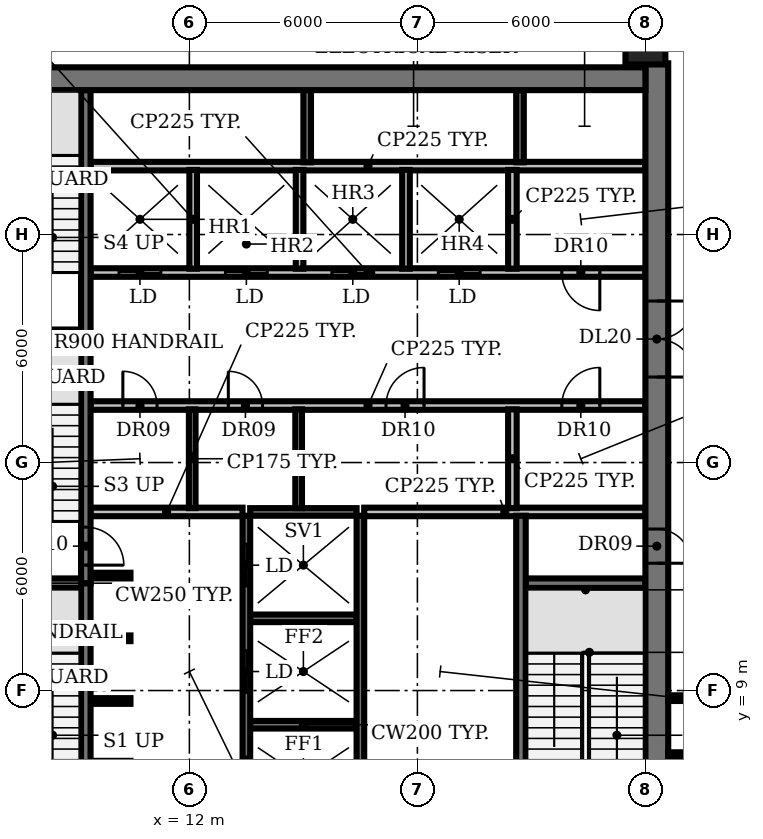
"""IFC4 building model, lengths in metres.
Left out: names, types, materials, properties, quantities, classifications, styles, units other than length and angle.
Written with IfcOpenShell. Run it as: python <this file> out.ifc"""

import sys

from ifc_helpers import new_model, si_unit, direction, frame, frame_2d, origin, origin_2d, place, context, subcontext, project, spatial, rectangle, circle, extrude, element, fill, save


model = new_model("IFC4")
c1 = context("Model", 3, precision=1e-05, world=origin(), true_north=direction((0.0, 1.0)))
c2 = subcontext(c1, "Body", "Model", "MODEL_VIEW")
j1 = project(units=[si_unit("LENGTHUNIT", "METRE"), si_unit("PLANEANGLEUNIT", "RADIAN")], contexts=[c1])
p1 = place(None, origin())
s1 = spatial("IfcSite", under=j1, at=p1, CompositionType="ELEMENT")
p2 = place(p1, origin())
s2 = spatial("IfcBuilding", under=s1, at=p2, CompositionType="ELEMENT")
p3 = place(p2, frame((0.0, 0.0, 192.8)))
s3 = spatial("IfcBuildingStorey", under=s2, at=p3, CompositionType="ELEMENT", Elevation=192.8)
p4 = place(p3, frame((24.0, 26.0, 0.0), z_axis=(0.0, 0.0, 1.0), x_axis=(1.0, 0.0, 0.0)))
e1 = element("IfcColumn", 1, at=p4, inside=s3, PredefinedType="COLUMN", context=c2, shape_type="SweptSolid", body=[
    extrude(circle(Radius=0.525, at=origin_2d()), origin(), (0.0, 0.0, 1.0), 3.2),
])
p5 = place(p3, frame((13.6, 8.1, 0.0), z_axis=(0.0, 0.0, 1.0), x_axis=(1.0, 0.0, 0.0)))
e2 = element("IfcWall", 2, at=p5, inside=s3, PredefinedType="SHEAR", context=c2, shape_type="SweptSolid", body=[
    extrude(rectangle(XDim=2.8, YDim=0.2, at=frame_2d((1.4, 0.0))), origin(), (0.0, 0.0, 1.0), 3.8),
])
for number, where, z_axis, x_axis in (
    (3, (9.4, 8.725, 0.0), (0.0, 0.0, 1.0), (1.0, 0.0, 0.0)),
    (4, (9.4, 10.375, 0.0), (0.0, 0.0, 1.0), (1.0, 0.0, 0.0)),
):
    element("IfcWall", number, at=place(p3, frame(where, z_axis=z_axis, x_axis=x_axis)), inside=s3, PredefinedType="SHEAR", context=c2, shape_type="SweptSolid", body=[
        extrude(rectangle(XDim=1.05, YDim=0.15, at=frame_2d((0.525, 0.0))), origin(), (0.0, 0.0, 1.0), 3.8),
    ])
p6 = place(p3, frame((13.6, 10.9, 0.0), z_axis=(0.0, 0.0, 1.0), x_axis=(1.0, 0.0, 0.0)))
e5 = element("IfcWall", 5, at=p6, inside=s3, PredefinedType="SHEAR", context=c2, shape_type="SweptSolid", body=[
    extrude(rectangle(XDim=2.8, YDim=0.2, at=frame_2d((1.4, 0.0))), origin(), (0.0, 0.0, 1.0), 3.8),
])
for number, where, z_axis, x_axis in (
    (6, (6.0, 11.825, 0.0), (0.0, 0.0, 1.0), (1.0, 0.0, 0.0)),
    (7, (20.85, 11.825, 0.0), (0.0, 0.0, 1.0), (1.0, 0.0, 0.0)),
):
    element("IfcWall", number, at=place(p3, frame(where, z_axis=z_axis, x_axis=x_axis)), inside=s3, PredefinedType="SHEAR", context=c2, shape_type="SweptSolid", body=[
        extrude(rectangle(XDim=3.15, YDim=0.25, at=frame_2d((1.575, 0.0))), origin(), (0.0, 0.0, 1.0), 3.8),
    ])
p7 = place(p3, frame((9.4, 12.025, 0.0), z_axis=(0.0, 0.0, 1.0), x_axis=(1.0, 0.0, 0.0)))
e8 = element("IfcWall", 8, at=p7, inside=s3, PredefinedType="SHEAR", context=c2, shape_type="SweptSolid", body=[
    extrude(rectangle(XDim=1.05, YDim=0.15, at=frame_2d((0.525, 0.0))), origin(), (0.0, 0.0, 1.0), 3.8),
])
p8 = place(p3, frame((9.4, 13.7, 0.0), z_axis=(0.0, 0.0, 1.0), x_axis=(1.0, 0.0, 0.0)))
e9 = element("IfcWall", 9, at=p8, inside=s3, PredefinedType="PARTITIONING", context=c2, shape_type="SweptSolid", body=[
    extrude(rectangle(XDim=4.0, YDim=0.225, at=frame_2d((2.0, 0.0))), origin(), (0.0, 0.0, 1.0), 3.8),
])
p9 = place(p3, frame((13.6, 13.7, 0.0), z_axis=(0.0, 0.0, 1.0), x_axis=(1.0, 0.0, 0.0)))
e10 = element("IfcWall", 10, at=p9, inside=s3, PredefinedType="SHEAR", context=c2, shape_type="SweptSolid", body=[
    extrude(rectangle(XDim=2.8, YDim=0.2, at=frame_2d((1.4, 0.0))), origin(), (0.0, 0.0, 1.0), 3.8),
])
p10 = place(p3, frame((16.6, 13.7, 0.0), z_axis=(0.0, 0.0, 1.0), x_axis=(1.0, 0.0, 0.0)))
e11 = element("IfcWall", 11, at=p10, inside=s3, PredefinedType="PARTITIONING", context=c2, shape_type="SweptSolid", body=[
    extrude(rectangle(XDim=7.4, YDim=0.225, at=frame_2d((3.7, 0.0))), origin(), (0.0, 0.0, 1.0), 3.8),
])
p11 = place(p3, frame((9.4, 16.5, 0.0), z_axis=(0.0, 0.0, 1.0), x_axis=(1.0, 0.0, 0.0)))
e12 = element("IfcWall", 12, at=p11, inside=s3, PredefinedType="PARTITIONING", context=c2, shape_type="SweptSolid", body=[
    extrude(rectangle(XDim=14.6, YDim=0.225, at=frame_2d((7.3, 0.0))), origin(), (0.0, 0.0, 1.0), 3.8),
])
p12 = place(p11, frame((0.85, 0.0, 0.0)))
e13 = element("IfcOpeningElement", 13, at=p12, cuts=e12, PredefinedType="OPENING", context=c2, shape_type="SweptSolid", body=[
    extrude(rectangle(XDim=0.9, YDim=2.1, at=frame_2d((0.45, 1.05))), frame((0.0, 0.123, 0.0), z_axis=(0.0, -1.0, 0.0), x_axis=(1.0, 0.0, 0.0)), (0.0, 0.0, 1.0), 0.245),
])
p13 = place(p11, frame((3.625, 0.0, 0.0)))
e14 = element("IfcOpeningElement", 14, at=p13, cuts=e12, PredefinedType="OPENING", context=c2, shape_type="SweptSolid", body=[
    extrude(rectangle(XDim=0.9, YDim=2.1, at=frame_2d((0.45, 1.05))), frame((0.0, 0.123, 0.0), z_axis=(0.0, -1.0, 0.0), x_axis=(1.0, 0.0, 0.0)), (0.0, 0.0, 1.0), 0.245),
])
p14 = place(p11, frame((7.775, 0.0, 0.0)))
e15 = element("IfcOpeningElement", 15, at=p14, cuts=e12, PredefinedType="OPENING", context=c2, shape_type="SweptSolid", body=[
    extrude(rectangle(XDim=1.0, YDim=2.1, at=frame_2d((0.5, 1.05))), frame((0.0, 0.123, 0.0), z_axis=(0.0, -1.0, 0.0), x_axis=(1.0, 0.0, 0.0)), (0.0, 0.0, 1.0), 0.245),
])
p15 = place(p11, frame((12.4, 0.0, 0.0)))
e16 = element("IfcOpeningElement", 16, at=p15, cuts=e12, PredefinedType="OPENING", context=c2, shape_type="SweptSolid", body=[
    extrude(rectangle(XDim=1.0, YDim=2.1, at=frame_2d((0.5, 1.05))), frame((0.0, 0.123, 0.0), z_axis=(0.0, -1.0, 0.0), x_axis=(1.0, 0.0, 0.0)), (0.0, 0.0, 1.0), 0.245),
])
p16 = place(p3, frame((6.0, 18.375, 0.0), z_axis=(0.0, 0.0, 1.0), x_axis=(1.0, 0.0, 0.0)))
e17 = element("IfcWall", 17, at=p16, inside=s3, PredefinedType="SHEAR", context=c2, shape_type="SweptSolid", body=[
    extrude(rectangle(XDim=3.15, YDim=0.25, at=frame_2d((1.575, 0.0))), origin(), (0.0, 0.0, 1.0), 3.8),
])
p17 = place(p3, frame((24.0, 20.0, 0.0), z_axis=(0.0, 0.0, 1.0), x_axis=(-1.0, 0.0, 0.0)))
e18 = element("IfcWall", 18, at=p17, inside=s3, PredefinedType="PARTITIONING", context=c2, shape_type="SweptSolid", body=[
    extrude(rectangle(XDim=14.6, YDim=0.225, at=frame_2d((7.3, 0.0))), origin(), (0.0, 0.0, 1.0), 3.8),
])
p18 = place(p17, frame((12.75, 0.0, 0.0)))
e19 = element("IfcOpeningElement", 19, at=p18, cuts=e18, PredefinedType="OPENING", context=c2, shape_type="SweptSolid", body=[
    extrude(rectangle(XDim=1.1, YDim=2.1, at=frame_2d((0.55, 1.05))), frame((0.0, 0.123, 0.0), z_axis=(0.0, -1.0, 0.0), x_axis=(1.0, 0.0, 0.0)), (0.0, 0.0, 1.0), 0.245),
])
p19 = place(p17, frame((9.95, 0.0, 0.0)))
e20 = element("IfcOpeningElement", 20, at=p19, cuts=e18, PredefinedType="OPENING", context=c2, shape_type="SweptSolid", body=[
    extrude(rectangle(XDim=1.1, YDim=2.1, at=frame_2d((0.55, 1.05))), frame((0.0, 0.123, 0.0), z_axis=(0.0, -1.0, 0.0), x_axis=(1.0, 0.0, 0.0)), (0.0, 0.0, 1.0), 0.245),
])
p20 = place(p17, frame((7.15, 0.0, 0.0)))
e21 = element("IfcOpeningElement", 21, at=p20, cuts=e18, PredefinedType="OPENING", context=c2, shape_type="SweptSolid", body=[
    extrude(rectangle(XDim=1.1, YDim=2.1, at=frame_2d((0.55, 1.05))), frame((0.0, 0.123, 0.0), z_axis=(0.0, -1.0, 0.0), x_axis=(1.0, 0.0, 0.0)), (0.0, 0.0, 1.0), 0.245),
])
p21 = place(p17, frame((4.35, 0.0, 0.0)))
e22 = element("IfcOpeningElement", 22, at=p21, cuts=e18, PredefinedType="OPENING", context=c2, shape_type="SweptSolid", body=[
    extrude(rectangle(XDim=1.1, YDim=2.1, at=frame_2d((0.55, 1.05))), frame((0.0, 0.123, 0.0), z_axis=(0.0, -1.0, 0.0), x_axis=(1.0, 0.0, 0.0)), (0.0, 0.0, 1.0), 0.245),
])
p22 = place(p17, frame((1.2, 0.0, 0.0)))
e23 = element("IfcOpeningElement", 23, at=p22, cuts=e18, PredefinedType="OPENING", context=c2, shape_type="SweptSolid", body=[
    extrude(rectangle(XDim=1.0, YDim=2.1, at=frame_2d((0.5, 1.05))), frame((0.0, 0.123, 0.0), z_axis=(0.0, -1.0, 0.0), x_axis=(1.0, 0.0, 0.0)), (0.0, 0.0, 1.0), 0.245),
])
p23 = place(p3, frame((9.4, 22.8, 0.0), z_axis=(0.0, 0.0, 1.0), x_axis=(1.0, 0.0, 0.0)))
e24 = element("IfcWall", 24, at=p23, inside=s3, PredefinedType="PARTITIONING", context=c2, shape_type="SweptSolid", body=[
    extrude(rectangle(XDim=14.6, YDim=0.225, at=frame_2d((7.3, 0.0))), origin(), (0.0, 0.0, 1.0), 3.8),
])
p24 = place(p3, frame((9.275, 11.825, 0.0), z_axis=(0.0, 0.0, 1.0), x_axis=(0.0, -1.0, 0.0)))
e25 = element("IfcWall", 25, at=p24, inside=s3, PredefinedType="SHEAR", context=c2, shape_type="SweptSolid", body=[
    extrude(rectangle(XDim=6.425, YDim=0.25, at=frame_2d((3.212, 0.0))), origin(), (0.0, 0.0, 1.0), 3.8),
])
p25 = place(p24, frame((5.075, 0.0, 0.0)))
e26 = element("IfcOpeningElement", 26, at=p25, cuts=e25, PredefinedType="OPENING", context=c2, shape_type="SweptSolid", body=[
    extrude(rectangle(XDim=1.0, YDim=2.1, at=frame_2d((0.5, 1.05))), frame((0.0, 0.135, 0.0), z_axis=(0.0, -1.0, 0.0), x_axis=(1.0, 0.0, 0.0)), (0.0, 0.0, 1.0), 0.27),
])
p26 = place(p3, frame((9.275, 18.375, 0.0), z_axis=(0.0, 0.0, 1.0), x_axis=(0.0, -1.0, 0.0)))
e27 = element("IfcWall", 27, at=p26, inside=s3, PredefinedType="SHEAR", context=c2, shape_type="SweptSolid", body=[
    extrude(rectangle(XDim=6.55, YDim=0.25, at=frame_2d((3.275, 0.0))), origin(), (0.0, 0.0, 1.0), 3.8),
])
p27 = place(p26, frame((5.075, 0.0, 0.0)))
e28 = element("IfcOpeningElement", 28, at=p27, cuts=e27, PredefinedType="OPENING", context=c2, shape_type="SweptSolid", body=[
    extrude(rectangle(XDim=1.0, YDim=2.1, at=frame_2d((0.5, 1.05))), frame((0.0, 0.135, 0.0), z_axis=(0.0, -1.0, 0.0), x_axis=(1.0, 0.0, 0.0)), (0.0, 0.0, 1.0), 0.27),
])
p28 = place(p3, frame((9.275, 18.375, 0.0), z_axis=(0.0, 0.0, 1.0), x_axis=(0.0, 1.0, 0.0)))
e29 = element("IfcWall", 29, at=p28, inside=s3, PredefinedType="SHEAR", context=c2, shape_type="SweptSolid", body=[
    extrude(rectangle(XDim=6.425, YDim=0.25, at=frame_2d((3.212, 0.0))), origin(), (0.0, 0.0, 1.0), 3.8),
])
p29 = place(p3, frame((12.075, 13.8, 0.0), z_axis=(0.0, 0.0, 1.0), x_axis=(0.0, 1.0, 0.0)))
e30 = element("IfcWall", 30, at=p29, inside=s3, PredefinedType="PARTITIONING", context=c2, shape_type="SweptSolid", body=[
    extrude(rectangle(XDim=2.6, YDim=0.175, at=frame_2d((1.3, 0.0))), origin(), (0.0, 0.0, 1.0), 3.8),
])
p30 = place(p3, frame((12.1, 20.1, 0.0), z_axis=(0.0, 0.0, 1.0), x_axis=(0.0, 1.0, 0.0)))
e31 = element("IfcWall", 31, at=p30, inside=s3, PredefinedType="SOLIDWALL", context=c2, shape_type="SweptSolid", body=[
    extrude(rectangle(XDim=2.6, YDim=0.2, at=frame_2d((1.3, 0.0))), origin(), (0.0, 0.0, 1.0), 3.8),
])
p31 = place(p3, frame((13.5, 5.4, 0.0), z_axis=(0.0, 0.0, 1.0), x_axis=(0.0, 1.0, 0.0)))
e32 = element("IfcWall", 32, at=p31, inside=s3, PredefinedType="SHEAR", context=c2, shape_type="SweptSolid", body=[
    extrude(rectangle(XDim=8.2, YDim=0.2, at=frame_2d((4.1, 0.0))), origin(), (0.0, 0.0, 1.0), 3.8),
])
p32 = place(p31, frame((0.75, 0.0, 0.0)))
e33 = element("IfcOpeningElement", 33, at=p32, cuts=e32, PredefinedType="OPENING", context=c2, shape_type="SweptSolid", body=[
    extrude(rectangle(XDim=1.1, YDim=2.1, at=frame_2d((0.55, 1.05))), frame((0.0, 0.11, 0.0), z_axis=(0.0, -1.0, 0.0), x_axis=(1.0, 0.0, 0.0)), (0.0, 0.0, 1.0), 0.22),
])
p33 = place(p31, frame((3.55, 0.0, 0.0)))
e34 = element("IfcOpeningElement", 34, at=p33, cuts=e32, PredefinedType="OPENING", context=c2, shape_type="SweptSolid", body=[
    extrude(rectangle(XDim=1.1, YDim=2.1, at=frame_2d((0.55, 1.05))), frame((0.0, 0.11, 0.0), z_axis=(0.0, -1.0, 0.0), x_axis=(1.0, 0.0, 0.0)), (0.0, 0.0, 1.0), 0.22),
])
p34 = place(p31, frame((6.35, 0.0, 0.0)))
e35 = element("IfcOpeningElement", 35, at=p34, cuts=e32, PredefinedType="OPENING", context=c2, shape_type="SweptSolid", body=[
    extrude(rectangle(XDim=1.1, YDim=2.1, at=frame_2d((0.55, 1.05))), frame((0.0, 0.11, 0.0), z_axis=(0.0, -1.0, 0.0), x_axis=(1.0, 0.0, 0.0)), (0.0, 0.0, 1.0), 0.22),
])
p35 = place(p3, frame((14.875, 13.8, 0.0), z_axis=(0.0, 0.0, 1.0), x_axis=(0.0, 1.0, 0.0)))
e36 = element("IfcWall", 36, at=p35, inside=s3, PredefinedType="PARTITIONING", context=c2, shape_type="SweptSolid", body=[
    extrude(rectangle(XDim=2.6, YDim=0.175, at=frame_2d((1.3, 0.0))), origin(), (0.0, 0.0, 1.0), 3.8),
])
p36 = place(p3, frame((14.9, 20.1, 0.0), z_axis=(0.0, 0.0, 1.0), x_axis=(0.0, 1.0, 0.0)))
e37 = element("IfcWall", 37, at=p36, inside=s3, PredefinedType="SOLIDWALL", context=c2, shape_type="SweptSolid", body=[
    extrude(rectangle(XDim=2.6, YDim=0.2, at=frame_2d((1.3, 0.0))), origin(), (0.0, 0.0, 1.0), 3.8),
])
p37 = place(p3, frame((15.1, 22.9, 0.0), z_axis=(0.0, 0.0, 1.0), x_axis=(0.0, 1.0, 0.0)))
e38 = element("IfcWall", 38, at=p37, inside=s3, PredefinedType="SHEAR", context=c2, shape_type="SweptSolid", body=[
    extrude(rectangle(XDim=1.9, YDim=0.2, at=frame_2d((0.95, 0.0))), origin(), (0.0, 0.0, 1.0), 3.8),
])
p38 = place(p3, frame((16.5, 5.4, 0.0), z_axis=(0.0, 0.0, 1.0), x_axis=(0.0, 1.0, 0.0)))
e39 = element("IfcWall", 39, at=p38, inside=s3, PredefinedType="SHEAR", context=c2, shape_type="SweptSolid", body=[
    extrude(rectangle(XDim=8.2, YDim=0.2, at=frame_2d((4.1, 0.0))), origin(), (0.0, 0.0, 1.0), 3.8),
])
p39 = place(p3, frame((17.7, 20.1, 0.0), z_axis=(0.0, 0.0, 1.0), x_axis=(0.0, 1.0, 0.0)))
e40 = element("IfcWall", 40, at=p39, inside=s3, PredefinedType="SOLIDWALL", context=c2, shape_type="SweptSolid", body=[
    extrude(rectangle(XDim=2.6, YDim=0.2, at=frame_2d((1.3, 0.0))), origin(), (0.0, 0.0, 1.0), 3.8),
])
for number, where, z_axis, x_axis in (
    (41, (20.5, 13.8, 0.0), (0.0, 0.0, 1.0), (0.0, 1.0, 0.0)),
    (42, (20.5, 20.1, 0.0), (0.0, 0.0, 1.0), (0.0, 1.0, 0.0)),
):
    element("IfcWall", number, at=place(p3, frame(where, z_axis=z_axis, x_axis=x_axis)), inside=s3, PredefinedType="PARTITIONING", context=c2, shape_type="SweptSolid", body=[
        extrude(rectangle(XDim=2.6, YDim=0.225, at=frame_2d((1.3, 0.0))), origin(), (0.0, 0.0, 1.0), 3.8),
    ])
p40 = place(p3, frame((20.7, 22.9, 0.0), z_axis=(0.0, 0.0, 1.0), x_axis=(0.0, 1.0, 0.0)))
e43 = element("IfcWall", 43, at=p40, inside=s3, PredefinedType="SHEAR", context=c2, shape_type="SweptSolid", body=[
    extrude(rectangle(XDim=1.9, YDim=0.2, at=frame_2d((0.95, 0.0))), origin(), (0.0, 0.0, 1.0), 3.8),
])
p41 = place(p3, frame((20.725, 5.4, 0.0), z_axis=(0.0, 0.0, 1.0), x_axis=(0.0, 1.0, 0.0)))
e44 = element("IfcWall", 44, at=p41, inside=s3, PredefinedType="SHEAR", context=c2, shape_type="SweptSolid", body=[
    extrude(rectangle(XDim=8.2, YDim=0.25, at=frame_2d((4.1, 0.0))), origin(), (0.0, 0.0, 1.0), 3.8),
])
p42 = place(p3, frame((24.3, 25.505, 0.0), z_axis=(0.0, 0.0, 1.0), x_axis=(0.0, -1.0, 0.0)))
e45 = element("IfcWall", 45, at=p42, inside=s3, PredefinedType="SHEAR", context=c2, shape_type="SweptSolid", body=[
    extrude(rectangle(XDim=20.705, YDim=0.6, at=frame_2d((10.353, 0.0))), origin(), (0.0, 0.0, 1.0), 3.8),
])
p43 = place(p42, frame((18.355, 0.0, 0.0)))
e46 = element("IfcOpeningElement", 46, at=p43, cuts=e45, PredefinedType="OPENING", context=c2, shape_type="SweptSolid", body=[
    extrude(rectangle(XDim=1.5, YDim=2.1, at=frame_2d((0.75, 1.05))), frame((0.0, 0.31, 0.0), z_axis=(0.0, -1.0, 0.0), x_axis=(1.0, 0.0, 0.0)), (0.0, 0.0, 1.0), 0.62),
])
p44 = place(p42, frame((12.255, 0.0, 0.0)))
e47 = element("IfcOpeningElement", 47, at=p44, cuts=e45, PredefinedType="OPENING", context=c2, shape_type="SweptSolid", body=[
    extrude(rectangle(XDim=0.9, YDim=2.1, at=frame_2d((0.45, 1.05))), frame((0.0, 0.31, 0.0), z_axis=(0.0, -1.0, 0.0), x_axis=(1.0, 0.0, 0.0)), (0.0, 0.0, 1.0), 0.62),
])
p45 = place(p42, frame((6.255, 0.0, 0.0)))
e48 = element("IfcOpeningElement", 48, at=p45, cuts=e45, PredefinedType="OPENING", context=c2, shape_type="SweptSolid", body=[
    extrude(rectangle(XDim=2.0, YDim=2.1, at=frame_2d((1.0, 1.05))), frame((0.0, 0.31, 0.0), z_axis=(0.0, -1.0, 0.0), x_axis=(1.0, 0.0, 0.0)), (0.0, 0.0, 1.0), 0.62),
])
p46 = place(p3, frame((6.0, 25.1, 0.0), z_axis=(0.0, 0.0, 1.0), x_axis=(1.0, 0.0, 0.0)))
e49 = element("IfcWall", 49, at=p46, inside=s3, PredefinedType="SHEAR", context=c2, shape_type="SweptSolid", body=[
    extrude(rectangle(XDim=18.0, YDim=0.6, at=frame_2d((9.0, 0.0))), origin(), (0.0, 0.0, 1.0), 3.8),
])
for number, where, z_axis, x_axis in (
    (50, (24.6, 7.3, 0.0), (0.0, 0.0, 1.0), (1.0, 0.0, 0.0)),
    (51, (24.6, 8.8, 0.0), (0.0, 0.0, 1.0), (1.0, 0.0, 0.0)),
):
    element("IfcWall", number, at=place(p3, frame(where, z_axis=z_axis, x_axis=x_axis)), inside=s3, PredefinedType="PARTITIONING", context=c2, shape_type="SweptSolid", body=[
        extrude(rectangle(XDim=1.05, YDim=0.15, at=frame_2d((0.525, 0.0))), origin(), (0.0, 0.0, 1.0), 2.83),
    ])
p47 = place(p12, origin())
e52 = element("IfcDoor", 52, at=p47, inside=s3, OperationType="SINGLE_SWING_LEFT", PredefinedType="DOOR", context=c2, shape_type="SweptSolid", body=[
    extrude(rectangle(XDim=0.9, YDim=2.1, at=frame_2d((0.45, 1.05))), frame((0.0, 0.025, 0.0), z_axis=(0.0, -1.0, 0.0), x_axis=(1.0, 0.0, 0.0)), (0.0, 0.0, 1.0), 0.05),
])
fill(e13, e52)
p48 = place(p13, origin())
e53 = element("IfcDoor", 53, at=p48, inside=s3, OperationType="SINGLE_SWING_LEFT", PredefinedType="DOOR", context=c2, shape_type="SweptSolid", body=[
    extrude(rectangle(XDim=0.9, YDim=2.1, at=frame_2d((0.45, 1.05))), frame((0.0, 0.025, 0.0), z_axis=(0.0, -1.0, 0.0), x_axis=(1.0, 0.0, 0.0)), (0.0, 0.0, 1.0), 0.05),
])
fill(e14, e53)
p49 = place(p14, origin())
e54 = element("IfcDoor", 54, at=p49, inside=s3, OperationType="SINGLE_SWING_RIGHT", PredefinedType="DOOR", context=c2, shape_type="SweptSolid", body=[
    extrude(rectangle(XDim=1.0, YDim=2.1, at=frame_2d((0.5, 1.05))), frame((0.0, 0.025, 0.0), z_axis=(0.0, -1.0, 0.0), x_axis=(1.0, 0.0, 0.0)), (0.0, 0.0, 1.0), 0.05),
])
fill(e15, e54)
p50 = place(p15, origin())
e55 = element("IfcDoor", 55, at=p50, inside=s3, OperationType="SINGLE_SWING_RIGHT", PredefinedType="DOOR", context=c2, shape_type="SweptSolid", body=[
    extrude(rectangle(XDim=1.0, YDim=2.1, at=frame_2d((0.5, 1.05))), frame((0.0, 0.025, 0.0), z_axis=(0.0, -1.0, 0.0), x_axis=(1.0, 0.0, 0.0)), (0.0, 0.0, 1.0), 0.05),
])
fill(e16, e55)
p51 = place(p18, origin())
e56 = element("IfcDoor", 56, at=p51, inside=s3, OperationType="DOUBLE_DOOR_SLIDING", PredefinedType="DOOR", context=c2, shape_type="SweptSolid", body=[
    extrude(rectangle(XDim=1.1, YDim=2.1, at=frame_2d((0.55, 1.05))), frame((0.0, 0.025, 0.0), z_axis=(0.0, -1.0, 0.0), x_axis=(1.0, 0.0, 0.0)), (0.0, 0.0, 1.0), 0.05),
])
fill(e19, e56)
p52 = place(p19, origin())
e57 = element("IfcDoor", 57, at=p52, inside=s3, OperationType="DOUBLE_DOOR_SLIDING", PredefinedType="DOOR", context=c2, shape_type="SweptSolid", body=[
    extrude(rectangle(XDim=1.1, YDim=2.1, at=frame_2d((0.55, 1.05))), frame((0.0, 0.025, 0.0), z_axis=(0.0, -1.0, 0.0), x_axis=(1.0, 0.0, 0.0)), (0.0, 0.0, 1.0), 0.05),
])
fill(e20, e57)
p53 = place(p20, origin())
e58 = element("IfcDoor", 58, at=p53, inside=s3, OperationType="DOUBLE_DOOR_SLIDING", PredefinedType="DOOR", context=c2, shape_type="SweptSolid", body=[
    extrude(rectangle(XDim=1.1, YDim=2.1, at=frame_2d((0.55, 1.05))), frame((0.0, 0.025, 0.0), z_axis=(0.0, -1.0, 0.0), x_axis=(1.0, 0.0, 0.0)), (0.0, 0.0, 1.0), 0.05),
])
fill(e21, e58)
p54 = place(p21, origin())
e59 = element("IfcDoor", 59, at=p54, inside=s3, OperationType="DOUBLE_DOOR_SLIDING", PredefinedType="DOOR", context=c2, shape_type="SweptSolid", body=[
    extrude(rectangle(XDim=1.1, YDim=2.1, at=frame_2d((0.55, 1.05))), frame((0.0, 0.025, 0.0), z_axis=(0.0, -1.0, 0.0), x_axis=(1.0, 0.0, 0.0)), (0.0, 0.0, 1.0), 0.05),
])
fill(e22, e59)
p55 = place(p22, origin())
e60 = element("IfcDoor", 60, at=p55, inside=s3, OperationType="SINGLE_SWING_LEFT", PredefinedType="DOOR", context=c2, shape_type="SweptSolid", body=[
    extrude(rectangle(XDim=1.0, YDim=2.1, at=frame_2d((0.5, 1.05))), frame((0.0, 0.025, 0.0), z_axis=(0.0, -1.0, 0.0), x_axis=(1.0, 0.0, 0.0)), (0.0, 0.0, 1.0), 0.05),
])
fill(e23, e60)
p56 = place(p27, origin())
e61 = element("IfcDoor", 61, at=p56, inside=s3, OperationType="SINGLE_SWING_RIGHT", PredefinedType="DOOR", context=c2, shape_type="SweptSolid", body=[
    extrude(rectangle(XDim=1.0, YDim=2.1, at=frame_2d((0.5, 1.05))), frame((0.0, 0.025, 0.0), z_axis=(0.0, -1.0, 0.0), x_axis=(1.0, 0.0, 0.0)), (0.0, 0.0, 1.0), 0.05),
])
fill(e28, e61)
p57 = place(p32, origin())
e62 = element("IfcDoor", 62, at=p57, inside=s3, OperationType="DOUBLE_DOOR_SLIDING", PredefinedType="DOOR", context=c2, shape_type="SweptSolid", body=[
    extrude(rectangle(XDim=1.1, YDim=2.1, at=frame_2d((0.55, 1.05))), frame((0.0, 0.025, 0.0), z_axis=(0.0, -1.0, 0.0), x_axis=(1.0, 0.0, 0.0)), (0.0, 0.0, 1.0), 0.05),
])
fill(e33, e62)
p58 = place(p33, origin())
e63 = element("IfcDoor", 63, at=p58, inside=s3, OperationType="DOUBLE_DOOR_SLIDING", PredefinedType="DOOR", context=c2, shape_type="SweptSolid", body=[
    extrude(rectangle(XDim=1.1, YDim=2.1, at=frame_2d((0.55, 1.05))), frame((0.0, 0.025, 0.0), z_axis=(0.0, -1.0, 0.0), x_axis=(1.0, 0.0, 0.0)), (0.0, 0.0, 1.0), 0.05),
])
fill(e34, e63)
p59 = place(p34, origin())
e64 = element("IfcDoor", 64, at=p59, inside=s3, OperationType="DOUBLE_DOOR_SLIDING", PredefinedType="DOOR", context=c2, shape_type="SweptSolid", body=[
    extrude(rectangle(XDim=1.1, YDim=2.1, at=frame_2d((0.55, 1.05))), frame((0.0, 0.025, 0.0), z_axis=(0.0, -1.0, 0.0), x_axis=(1.0, 0.0, 0.0)), (0.0, 0.0, 1.0), 0.05),
])
fill(e35, e64)
p60 = place(p44, origin())
e65 = element("IfcDoor", 65, at=p60, inside=s3, OperationType="SINGLE_SWING_RIGHT", PredefinedType="DOOR", context=c2, shape_type="SweptSolid", body=[
    extrude(rectangle(XDim=0.9, YDim=2.1, at=frame_2d((0.45, 1.05))), frame((0.0, -0.24, 0.0), z_axis=(0.0, -1.0, 0.0), x_axis=(1.0, 0.0, 0.0)), (0.0, 0.0, 1.0), 0.05),
])
fill(e47, e65)
p61 = place(p45, origin())
e66 = element("IfcDoor", 66, at=p61, inside=s3, OperationType="DOUBLE_DOOR_SINGLE_SWING", PredefinedType="DOOR", context=c2, shape_type="SweptSolid", body=[
    extrude(rectangle(XDim=2.0, YDim=2.1, at=frame_2d((1.0, 1.05))), frame((0.0, 0.025, 0.0), z_axis=(0.0, -1.0, 0.0), x_axis=(1.0, 0.0, 0.0)), (0.0, 0.0, 1.0), 0.05),
])
fill(e48, e66)
save(model, sys.argv[1])
